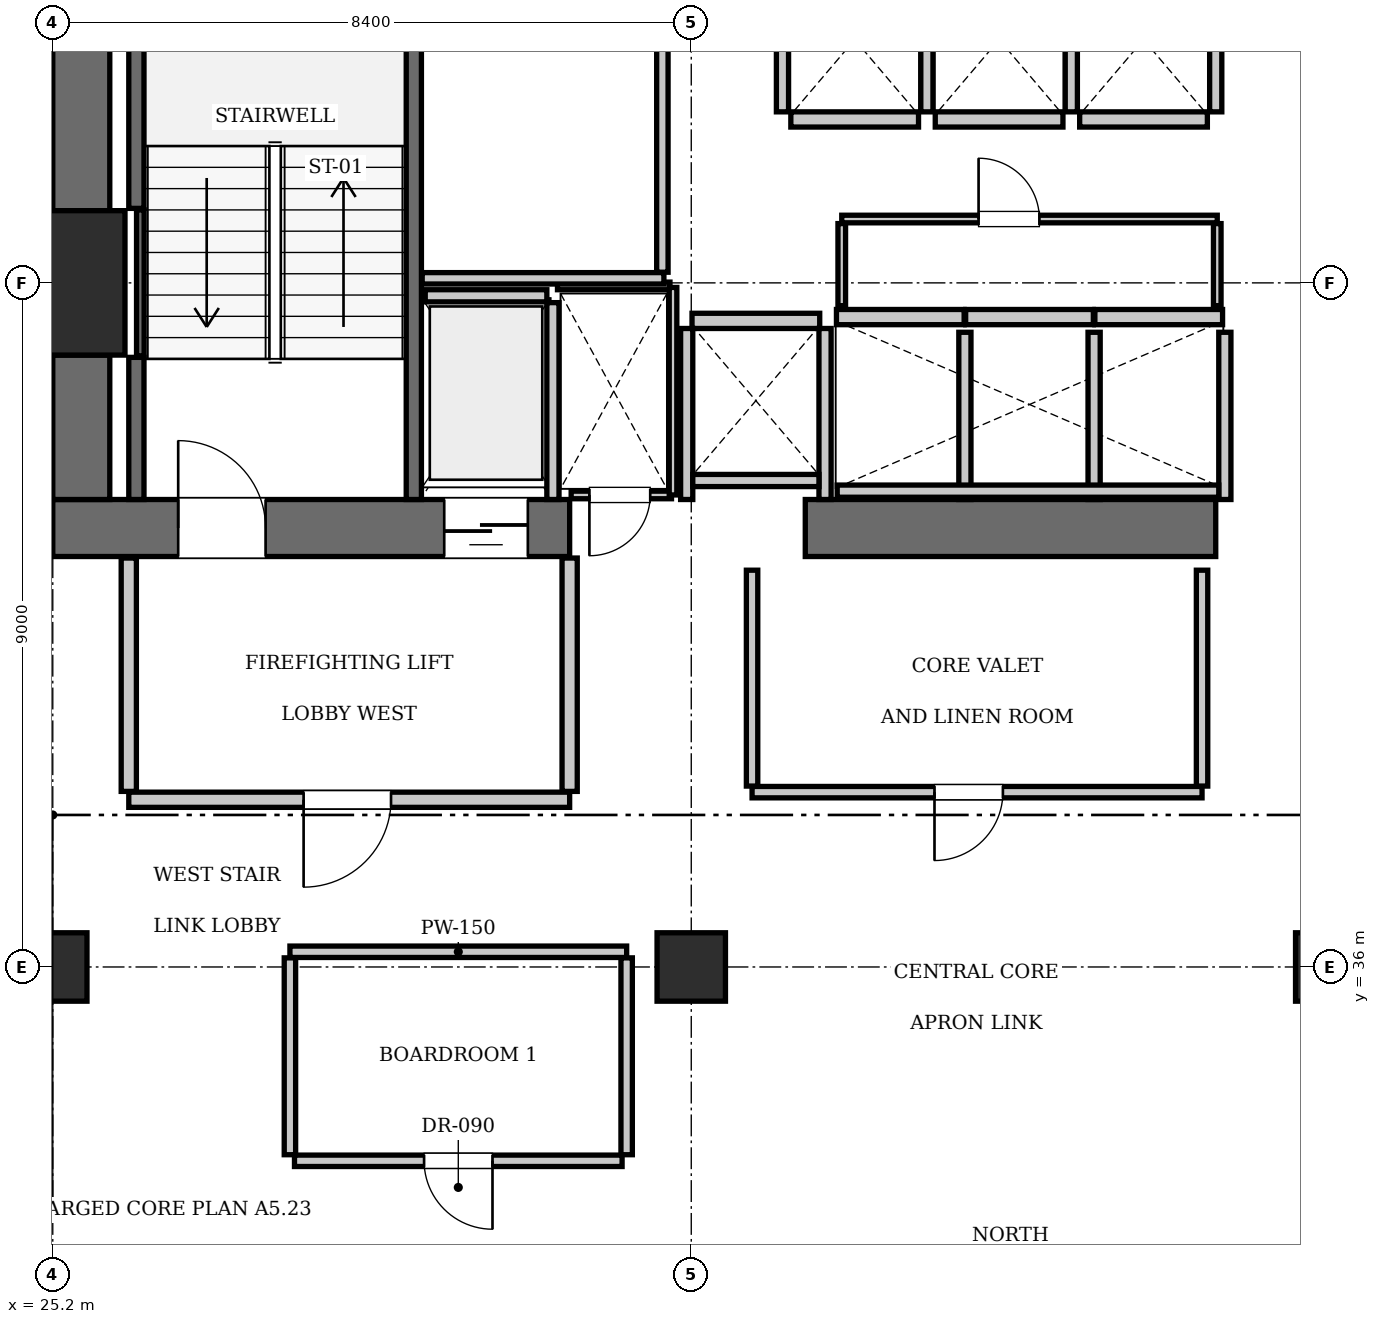
"""IFC4 building model, lengths in metres.
Left out: names, types, materials, properties, quantities, classifications, styles, units other than length and angle.
Written with IfcOpenShell. Run it as: python <this file> out.ifc"""

import sys

from ifc_helpers import new_model, si_unit, direction, frame, frame_2d, origin, origin_2d, place, context, subcontext, project, spatial, rectangle, extrude, element, fill, save


model = new_model("IFC4")
c1 = context("Model", 3, precision=1e-05, world=origin(), true_north=direction((0.0, 1.0)))
c2 = subcontext(c1, "Body", "Model", "MODEL_VIEW")
j1 = project(units=[si_unit("LENGTHUNIT", "METRE"), si_unit("PLANEANGLEUNIT", "RADIAN")], contexts=[c1])
p1 = place(None, origin())
s1 = spatial("IfcSite", under=j1, at=p1, CompositionType="ELEMENT")
p2 = place(p1, origin())
s2 = spatial("IfcBuilding", under=s1, at=p2, CompositionType="ELEMENT")
p3 = place(p2, frame((0.0, 0.0, 208.25)))
s3 = spatial("IfcBuildingStorey", under=s2, at=p3, CompositionType="ELEMENT", Elevation=208.25)
p4 = place(p3, frame((25.2, 45.0, 0.0), z_axis=(0.0, 0.0, 1.0), x_axis=(1.0, 0.0, 0.0)))
e1 = element("IfcColumn", 1, at=p4, inside=s3, PredefinedType="COLUMN", context=c2, shape_type="SweptSolid", body=[
    extrude(rectangle(XDim=1.9, YDim=1.9, at=origin_2d()), origin(), (0.0, 0.0, 1.0), 3.85),
])
p5 = place(p3, frame((25.2, 41.775, 0.0), z_axis=(0.0, 0.0, 1.0), x_axis=(1.0, 0.0, 0.0)))
e2 = element("IfcWall", 2, at=p5, inside=s3, PredefinedType="SHEAR", context=c2, shape_type="SweptSolid", body=[
    extrude(rectangle(XDim=6.8, YDim=0.75, at=frame_2d((3.4, 0.0))), origin(), (0.0, 0.0, 1.0), 3.85),
])
p6 = place(p5, frame((1.65, 0.0, 0.0)))
e3 = element("IfcOpeningElement", 3, at=p6, cuts=e2, PredefinedType="OPENING", context=c2, shape_type="SweptSolid", body=[
    extrude(rectangle(XDim=1.15, YDim=2.15, at=frame_2d((0.575, 1.075))), frame((0.0, 0.385, 0.0), z_axis=(0.0, -1.0, 0.0), x_axis=(1.0, 0.0, 0.0)), (0.0, 0.0, 1.0), 0.77),
])
p7 = place(p5, frame((5.15, 0.0, 0.0)))
e4 = element("IfcOpeningElement", 4, at=p7, cuts=e2, PredefinedType="OPENING", context=c2, shape_type="SweptSolid", body=[
    extrude(rectangle(XDim=1.1, YDim=2.2, at=frame_2d((0.55, 1.1))), frame((0.0, 0.385, 0.0), z_axis=(0.0, -1.0, 0.0), x_axis=(1.0, 0.0, 0.0)), (0.0, 0.0, 1.0), 0.77),
])
p8 = place(p3, frame((35.1, 41.775, 0.0), z_axis=(0.0, 0.0, 1.0), x_axis=(1.0, 0.0, 0.0)))
e5 = element("IfcWall", 5, at=p8, inside=s3, PredefinedType="SHEAR", context=c2, shape_type="SweptSolid", body=[
    extrude(rectangle(XDim=5.4, YDim=0.75, at=frame_2d((2.7, 0.0))), origin(), (0.0, 0.0, 1.0), 3.85),
])
p9 = place(p3, frame((25.575, 42.15, 0.0), z_axis=(0.0, 0.0, 1.0), x_axis=(0.0, 1.0, 0.0)))
e6 = element("IfcWall", 6, at=p9, inside=s3, PredefinedType="SHEAR", context=c2, shape_type="SweptSolid", body=[
    extrude(rectangle(XDim=1.9, YDim=0.75, at=frame_2d((0.95, 0.0))), origin(), (0.0, 0.0, 1.0), 3.85),
])
p10 = place(p3, frame((25.575, 45.95, 0.0), z_axis=(0.0, 0.0, 1.0), x_axis=(0.0, 1.0, 0.0)))
e7 = element("IfcWall", 7, at=p10, inside=s3, PredefinedType="SHEAR", context=c2, shape_type="SweptSolid", body=[
    extrude(rectangle(XDim=7.3, YDim=0.75, at=frame_2d((3.65, 0.0))), origin(), (0.0, 0.0, 1.0), 3.85),
])
for number, where, z_axis, x_axis in (
    (8, (25.2, 36.0, 0.0), (0.0, 0.0, 1.0), (1.0, 0.0, 0.0)),
    (9, (33.6, 36.0, 0.0), (0.0, 0.0, 1.0), (1.0, 0.0, 0.0)),
    (10, (42.0, 36.0, 0.0), (0.0, 0.0, 1.0), (1.0, 0.0, 0.0)),
):
    element("IfcColumn", number, at=place(p3, frame(where, z_axis=z_axis, x_axis=x_axis)), inside=s3, PredefinedType="COLUMN", context=c2, shape_type="SweptSolid", body=[
        extrude(rectangle(XDim=0.9, YDim=0.9, at=origin_2d()), origin(), (0.0, 0.0, 1.0), 3.85),
    ])
p11 = place(p3, frame((29.95, 42.15, 0.0), z_axis=(0.0, 0.0, 1.0), x_axis=(0.0, 1.0, 0.0)))
e11 = element("IfcWall", 11, at=p11, inside=s3, PredefinedType="SOLIDWALL", context=c2, shape_type="SweptSolid", body=[
    extrude(rectangle(XDim=9.0, YDim=0.2, at=frame_2d((4.5, 0.0))), origin(), (0.0, 0.0, 1.0), 3.61),
])
p12 = place(p3, frame((26.3, 42.15, 0.0), z_axis=(0.0, 0.0, 1.0), x_axis=(0.0, 1.0, 0.0)))
e12 = element("IfcWall", 12, at=p12, inside=s3, PredefinedType="SOLIDWALL", context=c2, shape_type="SweptSolid", body=[
    extrude(rectangle(XDim=1.87, YDim=0.2, at=frame_2d((0.935, 0.0))), origin(), (0.0, 0.0, 1.0), 3.61),
])
p13 = place(p3, frame((26.3, 45.98, 0.0), z_axis=(0.0, 0.0, 1.0), x_axis=(0.0, 1.0, 0.0)))
e13 = element("IfcWall", 13, at=p13, inside=s3, PredefinedType="SOLIDWALL", context=c2, shape_type="SweptSolid", body=[
    extrude(rectangle(XDim=5.14, YDim=0.2, at=frame_2d((2.57, 0.0))), origin(), (0.0, 0.0, 1.0), 3.61),
])
p14 = place(p3, frame((26.352, 44.04, 0.0), z_axis=(0.0, 0.0, 1.0), x_axis=(0.0, 1.0, 0.0)))
e14 = element("IfcWall", 14, at=p14, inside=s3, PredefinedType="SOLIDWALL", context=c2, shape_type="SweptSolid", body=[
    extrude(rectangle(XDim=1.92, YDim=0.1, at=frame_2d((0.96, 0.0))), origin(), (0.0, 0.0, 1.0), 3.61),
])
for number, where, z_axis, x_axis in (
    (15, (35.51, 44.55, 0.0), (0.0, 0.0, 1.0), (1.0, 0.0, 0.0)),
    (16, (37.21, 44.55, 0.0), (0.0, 0.0, 1.0), (1.0, 0.0, 0.0)),
):
    element("IfcWall", number, at=place(p3, frame(where, z_axis=z_axis, x_axis=x_axis)), inside=s3, PredefinedType="SOLIDWALL", context=c2, shape_type="SweptSolid", body=[
        extrude(rectangle(XDim=1.68, YDim=0.2, at=frame_2d((0.84, 0.0))), origin(), (0.0, 0.0, 1.0), 3.61),
    ])
for number, where, z_axis, x_axis in (
    (17, (38.91, 44.55, 0.0), (0.0, 0.0, 1.0), (1.0, 0.0, 0.0)),
    (18, (34.91, 47.15, 0.0), (0.0, 0.0, 1.0), (1.0, 0.0, 0.0)),
):
    element("IfcWall", number, at=place(p3, frame(where, z_axis=z_axis, x_axis=x_axis)), inside=s3, PredefinedType="SOLIDWALL", context=c2, shape_type="SweptSolid", body=[
        extrude(rectangle(XDim=1.68, YDim=0.2, at=frame_2d((0.84, 0.0))), origin(), (0.0, 0.0, 1.0), 3.61),
    ])
for number, where, z_axis, x_axis in (
    (19, (36.81, 47.15, 0.0), (0.0, 0.0, 1.0), (1.0, 0.0, 0.0)),
    (20, (38.71, 47.15, 0.0), (0.0, 0.0, 1.0), (1.0, 0.0, 0.0)),
    (21, (33.61, 44.5, 0.0), (0.0, 0.0, 1.0), (1.0, 0.0, 0.0)),
):
    element("IfcWall", number, at=place(p3, frame(where, z_axis=z_axis, x_axis=x_axis)), inside=s3, PredefinedType="SOLIDWALL", context=c2, shape_type="SweptSolid", body=[
        extrude(rectangle(XDim=1.68, YDim=0.2, at=frame_2d((0.84, 0.0))), origin(), (0.0, 0.0, 1.0), 3.61),
    ])
p15 = place(p3, frame((30.1, 44.83, 0.0), z_axis=(0.0, 0.0, 1.0), x_axis=(1.0, 0.0, 0.0)))
e22 = element("IfcWall", 22, at=p15, inside=s3, PredefinedType="SOLIDWALL", context=c2, shape_type="SweptSolid", body=[
    extrude(rectangle(XDim=1.6, YDim=0.16, at=frame_2d((0.8, 0.0))), origin(), (0.0, 0.0, 1.0), 3.61),
])
p16 = place(p3, frame((31.78, 42.15, 0.0), z_axis=(0.0, 0.0, 1.0), x_axis=(0.0, 1.0, 0.0)))
e23 = element("IfcWall", 23, at=p16, inside=s3, PredefinedType="SOLIDWALL", context=c2, shape_type="SweptSolid", body=[
    extrude(rectangle(XDim=2.59, YDim=0.16, at=frame_2d((1.295, 0.0))), origin(), (0.0, 0.0, 1.0), 3.61),
])
for number, where, z_axis, x_axis in (
    (24, (37.2, 42.15, 0.0), (0.0, 0.0, 1.0), (0.0, 1.0, 0.0)),
    (25, (38.9, 42.15, 0.0), (0.0, 0.0, 1.0), (0.0, 1.0, 0.0)),
    (26, (40.62, 42.15, 0.0), (0.0, 0.0, 1.0), (0.0, 1.0, 0.0)),
):
    element("IfcWall", number, at=place(p3, frame(where, z_axis=z_axis, x_axis=x_axis)), inside=s3, PredefinedType="SOLIDWALL", context=c2, shape_type="SweptSolid", body=[
        extrude(rectangle(XDim=2.2, YDim=0.16, at=frame_2d((1.1, 0.0))), origin(), (0.0, 0.0, 1.0), 3.61),
    ])
p17 = place(p3, frame((35.52, 42.26, 0.0), z_axis=(0.0, 0.0, 1.0), x_axis=(1.0, 0.0, 0.0)))
e27 = element("IfcWall", 27, at=p17, inside=s3, PredefinedType="SOLIDWALL", context=c2, shape_type="SweptSolid", body=[
    extrude(rectangle(XDim=5.02, YDim=0.16, at=frame_2d((2.51, 0.0))), origin(), (0.0, 0.0, 1.0), 3.61),
])
for number, where, z_axis, x_axis in (
    (28, (34.8, 47.25, 0.0), (0.0, 0.0, 1.0), (0.0, 1.0, 0.0)),
    (29, (36.7, 47.25, 0.0), (0.0, 0.0, 1.0), (0.0, 1.0, 0.0)),
    (30, (38.6, 47.25, 0.0), (0.0, 0.0, 1.0), (0.0, 1.0, 0.0)),
    (31, (40.5, 47.25, 0.0), (0.0, 0.0, 1.0), (0.0, 1.0, 0.0)),
):
    element("IfcWall", number, at=place(p3, frame(where, z_axis=z_axis, x_axis=x_axis)), inside=s3, PredefinedType="SOLIDWALL", context=c2, shape_type="SweptSolid", body=[
        extrude(rectangle(XDim=2.19, YDim=0.16, at=frame_2d((1.095, 0.0))), origin(), (0.0, 0.0, 1.0), 3.61),
    ])
for number, where, z_axis, x_axis in (
    (32, (33.54, 42.15, 0.0), (0.0, 0.0, 1.0), (0.0, 1.0, 0.0)),
    (33, (35.36, 42.15, 0.0), (0.0, 0.0, 1.0), (0.0, 1.0, 0.0)),
):
    element("IfcWall", number, at=place(p3, frame(where, z_axis=z_axis, x_axis=x_axis)), inside=s3, PredefinedType="SOLIDWALL", context=c2, shape_type="SweptSolid", body=[
        extrude(rectangle(XDim=2.25, YDim=0.16, at=frame_2d((1.125, 0.0))), origin(), (0.0, 0.0, 1.0), 3.61),
    ])
p18 = place(p3, frame((33.62, 42.4, 0.0), z_axis=(0.0, 0.0, 1.0), x_axis=(1.0, 0.0, 0.0)))
e34 = element("IfcWall", 34, at=p18, inside=s3, PredefinedType="SOLIDWALL", context=c2, shape_type="SweptSolid", body=[
    extrude(rectangle(XDim=1.66, YDim=0.16, at=frame_2d((0.83, 0.0))), origin(), (0.0, 0.0, 1.0), 3.61),
])
p19 = place(p3, frame((26.2, 38.2, 0.0), z_axis=(0.0, 0.0, 1.0), x_axis=(1.0, 0.0, 0.0)))
e35 = element("IfcWall", 35, at=p19, inside=s3, PredefinedType="PARTITIONING", context=c2, shape_type="SweptSolid", body=[
    extrude(rectangle(XDim=5.8, YDim=0.2, at=frame_2d((2.9, 0.0))), origin(), (0.0, 0.0, 1.0), 3.61),
])
p20 = place(p19, frame((2.3, 0.0, 0.0)))
e36 = element("IfcOpeningElement", 36, at=p20, cuts=e35, PredefinedType="OPENING", context=c2, shape_type="SweptSolid", body=[
    extrude(rectangle(XDim=1.15, YDim=2.15, at=frame_2d((0.575, 1.075))), frame((0.0, 0.11, 0.0), z_axis=(0.0, -1.0, 0.0), x_axis=(1.0, 0.0, 0.0)), (0.0, 0.0, 1.0), 0.22),
])
for number, where, z_axis, x_axis in (
    (37, (26.2, 38.31, 0.0), (0.0, 0.0, 1.0), (0.0, 1.0, 0.0)),
    (38, (32.0, 38.31, 0.0), (0.0, 0.0, 1.0), (0.0, 1.0, 0.0)),
):
    element("IfcWall", number, at=place(p3, frame(where, z_axis=z_axis, x_axis=x_axis)), inside=s3, PredefinedType="PARTITIONING", context=c2, shape_type="SweptSolid", body=[
        extrude(rectangle(XDim=3.07, YDim=0.2, at=frame_2d((1.535, 0.0))), origin(), (0.0, 0.0, 1.0), 3.61),
    ])
p21 = place(p3, frame((32.02, 42.21, 0.0), z_axis=(0.0, 0.0, 1.0), x_axis=(1.0, 0.0, 0.0)))
e39 = element("IfcWall", 39, at=p21, inside=s3, PredefinedType="PARTITIONING", context=c2, shape_type="SweptSolid", body=[
    extrude(rectangle(XDim=1.32, YDim=0.1, at=frame_2d((0.66, 0.0))), origin(), (0.0, 0.0, 1.0), 3.61),
])
p22 = place(p21, frame((0.24, 0.0, 0.0)))
e40 = element("IfcOpeningElement", 40, at=p22, cuts=e39, PredefinedType="OPENING", context=c2, shape_type="SweptSolid", body=[
    extrude(rectangle(XDim=0.8, YDim=2.05, at=frame_2d((0.4, 1.025))), frame((0.0, 0.06, 0.0), z_axis=(0.0, -1.0, 0.0), x_axis=(1.0, 0.0, 0.0)), (0.0, 0.0, 1.0), 0.12),
])
p23 = place(p3, frame((31.84, 44.96, 0.0), z_axis=(0.0, 0.0, 1.0), x_axis=(1.0, 0.0, 0.0)))
e41 = element("IfcWall", 41, at=p23, inside=s3, PredefinedType="PARTITIONING", context=c2, shape_type="SweptSolid", body=[
    extrude(rectangle(XDim=1.48, YDim=0.1, at=frame_2d((0.74, 0.0))), origin(), (0.0, 0.0, 1.0), 3.61),
])
p24 = place(p3, frame((33.36, 42.21, 0.0), z_axis=(0.0, 0.0, 1.0), x_axis=(0.0, 1.0, 0.0)))
e42 = element("IfcWall", 42, at=p24, inside=s3, PredefinedType="PARTITIONING", context=c2, shape_type="SweptSolid", body=[
    extrude(rectangle(XDim=2.73, YDim=0.1, at=frame_2d((1.365, 0.0))), origin(), (0.0, 0.0, 1.0), 3.61),
])
p25 = place(p3, frame((35.58, 45.84, 0.0), z_axis=(0.0, 0.0, 1.0), x_axis=(1.0, 0.0, 0.0)))
e43 = element("IfcWall", 43, at=p25, inside=s3, PredefinedType="PARTITIONING", context=c2, shape_type="SweptSolid", body=[
    extrude(rectangle(XDim=4.94, YDim=0.1, at=frame_2d((2.47, 0.0))), origin(), (0.0, 0.0, 1.0), 3.61),
])
p26 = place(p25, frame((1.8, 0.0, 0.0)))
e44 = element("IfcOpeningElement", 44, at=p26, cuts=e43, PredefinedType="OPENING", context=c2, shape_type="SweptSolid", body=[
    extrude(rectangle(XDim=0.8, YDim=2.05, at=frame_2d((0.4, 1.025))), frame((0.0, 0.06, 0.0), z_axis=(0.0, -1.0, 0.0), x_axis=(1.0, 0.0, 0.0)), (0.0, 0.0, 1.0), 0.12),
])
for number, where, z_axis, x_axis in (
    (45, (35.58, 44.7, 0.0), (0.0, 0.0, 1.0), (0.0, 1.0, 0.0)),
    (46, (40.52, 44.7, 0.0), (0.0, 0.0, 1.0), (0.0, 1.0, 0.0)),
):
    element("IfcWall", number, at=place(p3, frame(where, z_axis=z_axis, x_axis=x_axis)), inside=s3, PredefinedType="PARTITIONING", context=c2, shape_type="SweptSolid", body=[
        extrude(rectangle(XDim=1.08, YDim=0.1, at=frame_2d((0.54, 0.0))), origin(), (0.0, 0.0, 1.0), 3.61),
    ])
p27 = place(p3, frame((30.06, 45.06, 0.0), z_axis=(0.0, 0.0, 1.0), x_axis=(1.0, 0.0, 0.0)))
e47 = element("IfcWall", 47, at=p27, inside=s3, PredefinedType="PARTITIONING", context=c2, shape_type="SweptSolid", body=[
    extrude(rectangle(XDim=3.18, YDim=0.15, at=frame_2d((1.59, 0.0))), origin(), (0.0, 0.0, 1.0), 3.61),
])
p28 = place(p3, frame((33.22, 45.14, 0.0), z_axis=(0.0, 0.0, 1.0), x_axis=(0.0, 1.0, 0.0)))
e48 = element("IfcWall", 48, at=p28, inside=s3, PredefinedType="PARTITIONING", context=c2, shape_type="SweptSolid", body=[
    extrude(rectangle(XDim=4.16, YDim=0.15, at=frame_2d((2.08, 0.0))), origin(), (0.0, 0.0, 1.0), 3.61),
])
p29 = place(p3, frame((34.4, 38.3, 0.0), z_axis=(0.0, 0.0, 1.0), x_axis=(1.0, 0.0, 0.0)))
e49 = element("IfcWall", 49, at=p29, inside=s3, PredefinedType="PARTITIONING", context=c2, shape_type="SweptSolid", body=[
    extrude(rectangle(XDim=5.92, YDim=0.15, at=frame_2d((2.96, 0.0))), origin(), (0.0, 0.0, 1.0), 3.61),
])
p30 = place(p29, frame((2.4, 0.0, 0.0)))
e50 = element("IfcOpeningElement", 50, at=p30, cuts=e49, PredefinedType="OPENING", context=c2, shape_type="SweptSolid", body=[
    extrude(rectangle(XDim=0.9, YDim=2.1, at=frame_2d((0.45, 1.05))), frame((0.0, 0.085, 0.0), z_axis=(0.0, -1.0, 0.0), x_axis=(1.0, 0.0, 0.0)), (0.0, 0.0, 1.0), 0.17),
])
for number, where, z_axis, x_axis in (
    (51, (34.4, 38.38, 0.0), (0.0, 0.0, 1.0), (0.0, 1.0, 0.0)),
    (52, (40.32, 38.38, 0.0), (0.0, 0.0, 1.0), (0.0, 1.0, 0.0)),
):
    element("IfcWall", number, at=place(p3, frame(where, z_axis=z_axis, x_axis=x_axis)), inside=s3, PredefinedType="PARTITIONING", context=c2, shape_type="SweptSolid", body=[
        extrude(rectangle(XDim=2.84, YDim=0.15, at=frame_2d((1.42, 0.0))), origin(), (0.0, 0.0, 1.0), 3.61),
    ])
p31 = place(p3, frame((28.32, 36.2, 0.0), z_axis=(0.0, 0.0, 1.0), x_axis=(1.0, 0.0, 0.0)))
e53 = element("IfcWall", 53, at=p31, inside=s3, PredefinedType="PARTITIONING", context=c2, shape_type="SweptSolid", body=[
    extrude(rectangle(XDim=4.43, YDim=0.15, at=frame_2d((2.215, 0.0))), origin(), (0.0, 0.0, 1.0), 3.61),
])
for number, where, z_axis, x_axis in (
    (54, (28.32, 33.53, 0.0), (0.0, 0.0, 1.0), (0.0, 1.0, 0.0)),
    (55, (32.75, 33.53, 0.0), (0.0, 0.0, 1.0), (0.0, 1.0, 0.0)),
):
    element("IfcWall", number, at=place(p3, frame(where, z_axis=z_axis, x_axis=x_axis)), inside=s3, PredefinedType="PARTITIONING", context=c2, shape_type="SweptSolid", body=[
        extrude(rectangle(XDim=2.59, YDim=0.15, at=frame_2d((1.295, 0.0))), origin(), (0.0, 0.0, 1.0), 3.61),
    ])
p32 = place(p3, frame((28.38, 33.45, 0.0), z_axis=(0.0, 0.0, 1.0), x_axis=(1.0, 0.0, 0.0)))
e56 = element("IfcWall", 56, at=p32, inside=s3, PredefinedType="PARTITIONING", context=c2, shape_type="SweptSolid", body=[
    extrude(rectangle(XDim=4.31, YDim=0.15, at=frame_2d((2.155, 0.0))), origin(), (0.0, 0.0, 1.0), 3.61),
])
p33 = place(p32, frame((1.705, 0.0, 0.0)))
e57 = element("IfcOpeningElement", 57, at=p33, cuts=e56, PredefinedType="OPENING", context=c2, shape_type="SweptSolid", body=[
    extrude(rectangle(XDim=0.9, YDim=2.1, at=frame_2d((0.45, 1.05))), frame((0.0, 0.085, 0.0), z_axis=(0.0, -1.0, 0.0), x_axis=(1.0, 0.0, 0.0)), (0.0, 0.0, 1.0), 0.17),
])
p34 = place(p6, origin())
e58 = element("IfcDoor", 58, at=p34, inside=s3, OperationType="SINGLE_SWING_LEFT", PredefinedType="DOOR", context=c2, shape_type="SweptSolid", body=[
    extrude(rectangle(XDim=1.15, YDim=2.15, at=frame_2d((0.575, 1.075))), frame((0.0, 0.025, 0.0), z_axis=(0.0, -1.0, 0.0), x_axis=(1.0, 0.0, 0.0)), (0.0, 0.0, 1.0), 0.05),
])
fill(e3, e58)
p35 = place(p7, frame((1.1, 0.0, 0.0), z_axis=(0.0, 0.0, 1.0), x_axis=(-1.0, 0.0, 0.0)))
e59 = element("IfcDoor", 59, at=p35, inside=s3, OperationType="SLIDING_TO_LEFT", PredefinedType="DOOR", context=c2, shape_type="SweptSolid", body=[
    extrude(rectangle(XDim=1.1, YDim=2.2, at=frame_2d((0.55, 1.1))), frame((0.0, 0.025, 0.0), z_axis=(0.0, -1.0, 0.0), x_axis=(1.0, 0.0, 0.0)), (0.0, 0.0, 1.0), 0.05),
])
fill(e4, e59)
p36 = place(p20, frame((1.15, 0.0, 0.0), z_axis=(0.0, 0.0, 1.0), x_axis=(-1.0, 0.0, 0.0)))
e60 = element("IfcDoor", 60, at=p36, inside=s3, OperationType="SINGLE_SWING_RIGHT", PredefinedType="DOOR", context=c2, shape_type="SweptSolid", body=[
    extrude(rectangle(XDim=1.15, YDim=2.15, at=frame_2d((0.575, 1.075))), frame((0.0, 0.025, 0.0), z_axis=(0.0, -1.0, 0.0), x_axis=(1.0, 0.0, 0.0)), (0.0, 0.0, 1.0), 0.05),
])
fill(e36, e60)
p37 = place(p22, frame((0.8, 0.0, 0.0), z_axis=(0.0, 0.0, 1.0), x_axis=(-1.0, 0.0, 0.0)))
e61 = element("IfcDoor", 61, at=p37, inside=s3, OperationType="SINGLE_SWING_RIGHT", PredefinedType="DOOR", context=c2, shape_type="SweptSolid", body=[
    extrude(rectangle(XDim=0.8, YDim=2.05, at=frame_2d((0.4, 1.025))), frame((0.0, 0.025, 0.0), z_axis=(0.0, -1.0, 0.0), x_axis=(1.0, 0.0, 0.0)), (0.0, 0.0, 1.0), 0.05),
])
fill(e40, e61)
p38 = place(p26, origin())
e62 = element("IfcDoor", 62, at=p38, inside=s3, OperationType="SINGLE_SWING_LEFT", PredefinedType="DOOR", context=c2, shape_type="SweptSolid", body=[
    extrude(rectangle(XDim=0.8, YDim=2.05, at=frame_2d((0.4, 1.025))), frame((0.0, 0.025, 0.0), z_axis=(0.0, -1.0, 0.0), x_axis=(1.0, 0.0, 0.0)), (0.0, 0.0, 1.0), 0.05),
])
fill(e44, e62)
p39 = place(p30, frame((0.9, 0.0, 0.0), z_axis=(0.0, 0.0, 1.0), x_axis=(-1.0, 0.0, 0.0)))
e63 = element("IfcDoor", 63, at=p39, inside=s3, OperationType="SINGLE_SWING_RIGHT", PredefinedType="DOOR", context=c2, shape_type="SweptSolid", body=[
    extrude(rectangle(XDim=0.9, YDim=2.1, at=frame_2d((0.45, 1.05))), frame((0.0, 0.025, 0.0), z_axis=(0.0, -1.0, 0.0), x_axis=(1.0, 0.0, 0.0)), (0.0, 0.0, 1.0), 0.05),
])
fill(e50, e63)
p40 = place(p33, frame((0.9, 0.0, 0.0), z_axis=(0.0, 0.0, 1.0), x_axis=(-1.0, 0.0, 0.0)))
e64 = element("IfcDoor", 64, at=p40, inside=s3, OperationType="SINGLE_SWING_LEFT", PredefinedType="DOOR", context=c2, shape_type="SweptSolid", body=[
    extrude(rectangle(XDim=0.9, YDim=2.1, at=frame_2d((0.45, 1.05))), frame((0.0, 0.025, 0.0), z_axis=(0.0, -1.0, 0.0), x_axis=(1.0, 0.0, 0.0)), (0.0, 0.0, 1.0), 0.05),
])
fill(e57, e64)
save(model, sys.argv[1])
